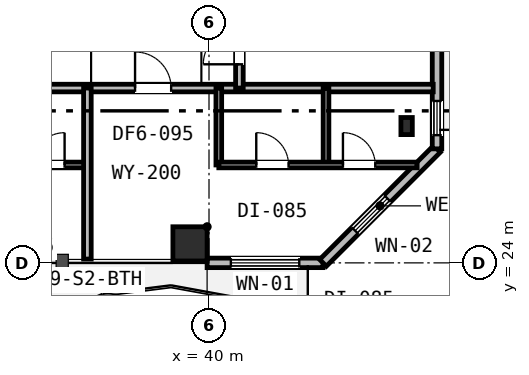
"""IFC4 building model, lengths in metres.
Left out: names, types, materials, properties, quantities, classifications, styles, units other than length and angle.
Written with IfcOpenShell. Run it as: python <this file> out.ifc"""

import sys

from ifc_helpers import new_model, si_unit, direction, frame, frame_2d, origin, origin_2d, place, context, subcontext, project, spatial, rectangle, i_section, extrude, element, fill, save


model = new_model("IFC4")
c1 = context("Model", 3, precision=1e-05, world=origin(), true_north=direction((0.0, 1.0)))
c2 = subcontext(c1, "Body", "Model", "MODEL_VIEW")
j1 = project(units=[si_unit("LENGTHUNIT", "METRE"), si_unit("PLANEANGLEUNIT", "RADIAN")], contexts=[c1])
p1 = place(None, origin())
s1 = spatial("IfcSite", under=j1, at=p1, CompositionType="ELEMENT")
p2 = place(p1, origin())
s2 = spatial("IfcBuilding", under=s1, at=p2, CompositionType="ELEMENT")
p3 = place(p2, frame((0.0, 0.0, 229.8)))
s3 = spatial("IfcBuildingStorey", under=s2, at=p3, CompositionType="ELEMENT", Elevation=229.8)
p4 = place(p3, frame((39.5, 24.5, 0.0), z_axis=(0.0, 0.0, 1.0), x_axis=(1.0, 0.0, 0.0)))
e1 = element("IfcColumn", 1, at=p4, inside=s3, PredefinedType="COLUMN", context=c2, shape_type="SweptSolid", body=[
    extrude(rectangle(XDim=0.9, YDim=0.9, at=origin_2d()), origin(), (0.0, 0.0, 1.0), 3.8),
])
p5 = place(p3, frame((45.2, 27.6, 0.0), z_axis=(0.0, 0.0, 1.0), x_axis=(1.0, 0.0, 0.0)))
e2 = element("IfcColumn", 2, at=p5, inside=s3, PredefinedType="COLUMN", context=c2, shape_type="SweptSolid", body=[
    extrude(i_section(OverallWidth=0.3, OverallDepth=0.45, WebThickness=0.014, FlangeThickness=0.026, FilletRadius=0.027, at=origin_2d()), origin(), (0.0, 0.0, 1.0), 3.8),
])
p6 = place(p3, frame((39.95, 24.0, 0.0), z_axis=(0.0, 0.0, 1.0), x_axis=(1.0, 0.0, 0.0)))
e3 = element("IfcWall", 3, at=p6, inside=s3, PredefinedType="STANDARD", context=c2, shape_type="SweptSolid", body=[
    extrude(rectangle(XDim=3.05, YDim=0.25, at=frame_2d((1.525, 0.0))), origin(), (0.0, 0.0, 1.0), 3.53),
])
p7 = place(p6, frame((0.625, 0.0, 0.75)))
e4 = element("IfcOpeningElement", 4, at=p7, cuts=e3, PredefinedType="OPENING", context=c2, shape_type="SweptSolid", body=[
    extrude(rectangle(XDim=1.8, YDim=1.85, at=frame_2d((0.9, 0.925))), frame((0.0, 0.135, 0.0), z_axis=(0.0, -1.0, 0.0), x_axis=(1.0, 0.0, 0.0)), (0.0, 0.0, 1.0), 0.27),
])
p8 = place(p3, frame((43.0, 24.0, 0.0), z_axis=(0.0, 0.0, 1.0), x_axis=(0.707106781187, 0.707106781187, 0.0)))
e5 = element("IfcWall", 5, at=p8, inside=s3, PredefinedType="STANDARD", context=c2, shape_type="SweptSolid", body=[
    extrude(rectangle(XDim=4.243, YDim=0.25, at=frame_2d((2.121, 0.0))), origin(), (0.0, 0.0, 1.0), 3.53),
])
p9 = place(p8, frame((1.196, 0.0, 0.85)))
e6 = element("IfcOpeningElement", 6, at=p9, cuts=e5, PredefinedType="OPENING", context=c2, shape_type="SweptSolid", body=[
    extrude(rectangle(XDim=1.2, YDim=1.6, at=frame_2d((0.6, 0.8))), frame((0.0, 0.135, 0.0), z_axis=(0.0, -1.0, 0.0), x_axis=(1.0, 0.0, 0.0)), (0.0, 0.0, 1.0), 0.27),
])
p10 = place(p3, frame((46.0, 27.0, 0.0), z_axis=(0.0, 0.0, 1.0), x_axis=(0.0, 1.0, 0.0)))
e7 = element("IfcWall", 7, at=p10, inside=s3, PredefinedType="STANDARD", context=c2, shape_type="SweptSolid", body=[
    extrude(rectangle(XDim=2.9, YDim=0.25, at=frame_2d((1.45, 0.0))), origin(), (0.0, 0.0, 1.0), 3.53),
])
p11 = place(p10, frame((0.36, 0.0, 0.9)))
e8 = element("IfcOpeningElement", 8, at=p11, cuts=e7, PredefinedType="OPENING", context=c2, shape_type="SweptSolid", body=[
    extrude(rectangle(XDim=0.9, YDim=1.55, at=frame_2d((0.45, 0.775))), frame((0.0, 0.135, 0.0), z_axis=(0.0, -1.0, 0.0), x_axis=(1.0, 0.0, 0.0)), (0.0, 0.0, 1.0), 0.27),
])
p12 = place(p3, frame((20.2, 28.6, 0.0), z_axis=(0.0, 0.0, 1.0), x_axis=(1.0, 0.0, 0.0)))
e9 = element("IfcWall", 9, at=p12, inside=s3, PredefinedType="PARTITIONING", context=c2, shape_type="SweptSolid", body=[
    extrude(rectangle(XDim=25.7, YDim=0.2, at=frame_2d((12.85, 0.0))), origin(), (0.0, 0.0, 1.0), 2.92),
])
p13 = place(p12, frame((4.475, 0.0, 0.0)))
e10 = element("IfcOpeningElement", 10, at=p13, cuts=e9, PredefinedType="OPENING", context=c2, shape_type="SweptSolid", body=[
    extrude(rectangle(XDim=0.95, YDim=2.15, at=frame_2d((0.475, 1.075))), frame((0.0, 0.11, 0.0), z_axis=(0.0, -1.0, 0.0), x_axis=(1.0, 0.0, 0.0)), (0.0, 0.0, 1.0), 0.22),
])
p14 = place(p12, frame((10.875, 0.0, 0.0)))
e11 = element("IfcOpeningElement", 11, at=p14, cuts=e9, PredefinedType="OPENING", context=c2, shape_type="SweptSolid", body=[
    extrude(rectangle(XDim=0.95, YDim=2.15, at=frame_2d((0.475, 1.075))), frame((0.0, 0.11, 0.0), z_axis=(0.0, -1.0, 0.0), x_axis=(1.0, 0.0, 0.0)), (0.0, 0.0, 1.0), 0.22),
])
p15 = place(p12, frame((17.854, 0.0, 0.0)))
e12 = element("IfcOpeningElement", 12, at=p15, cuts=e9, PredefinedType="OPENING", context=c2, shape_type="SweptSolid", body=[
    extrude(rectangle(XDim=0.95, YDim=2.15, at=frame_2d((0.475, 1.075))), frame((0.0, 0.11, 0.0), z_axis=(0.0, -1.0, 0.0), x_axis=(1.0, 0.0, 0.0)), (0.0, 0.0, 1.0), 0.22),
])
p16 = place(p3, frame((40.8, 28.6, 0.0), z_axis=(0.0, 0.0, 1.0), x_axis=(0.0, 1.0, 0.0)))
e13 = element("IfcWall", 13, at=p16, inside=s3, PredefinedType="PARTITIONING", context=c2, shape_type="SweptSolid", body=[
    extrude(rectangle(XDim=14.3, YDim=0.2, at=frame_2d((7.15, 0.0))), origin(), (0.0, 0.0, 1.0), 2.92),
])
p17 = place(p16, frame((0.625, 0.0, 0.0)))
e14 = element("IfcOpeningElement", 14, at=p17, cuts=e13, PredefinedType="OPENING", context=c2, shape_type="SweptSolid", body=[
    extrude(rectangle(XDim=0.95, YDim=2.15, at=frame_2d((0.475, 1.075))), frame((0.0, 0.11, 0.0), z_axis=(0.0, -1.0, 0.0), x_axis=(1.0, 0.0, 0.0)), (0.0, 0.0, 1.0), 0.22),
])
p18 = place(p3, frame((32.7, 26.576, 0.0), z_axis=(0.0, 0.0, 1.0), x_axis=(1.0, 0.0, 0.0)))
e15 = element("IfcWall", 15, at=p18, inside=s3, PredefinedType="PARTITIONING", context=c2, shape_type="SweptSolid", body=[
    extrude(rectangle(XDim=4.1, YDim=0.15, at=frame_2d((2.05, 0.0))), origin(), (0.0, 0.0, 1.0), 3.22),
])
p19 = place(p18, frame((0.6, 0.0, 0.0)))
e16 = element("IfcOpeningElement", 16, at=p19, cuts=e15, PredefinedType="OPENING", context=c2, shape_type="SweptSolid", body=[
    extrude(rectangle(XDim=0.85, YDim=2.15, at=frame_2d((0.425, 1.075))), frame((0.0, 0.085, 0.0), z_axis=(0.0, -1.0, 0.0), x_axis=(1.0, 0.0, 0.0)), (0.0, 0.0, 1.0), 0.17),
])
p20 = place(p18, frame((2.65, 0.0, 0.0)))
e17 = element("IfcOpeningElement", 17, at=p20, cuts=e15, PredefinedType="OPENING", context=c2, shape_type="SweptSolid", body=[
    extrude(rectangle(XDim=0.85, YDim=2.15, at=frame_2d((0.425, 1.075))), frame((0.0, 0.085, 0.0), z_axis=(0.0, -1.0, 0.0), x_axis=(1.0, 0.0, 0.0)), (0.0, 0.0, 1.0), 0.17),
])
p21 = place(p3, frame((36.8, 24.1, 0.0), z_axis=(0.0, 0.0, 1.0), x_axis=(0.0, 1.0, 0.0)))
e18 = element("IfcWall", 18, at=p21, inside=s3, PredefinedType="PARTITIONING", context=c2, shape_type="SweptSolid", body=[
    extrude(rectangle(XDim=4.5, YDim=0.2, at=frame_2d((2.25, 0.0))), origin(), (0.0, 0.0, 1.0), 3.22),
])
for number, where, z_axis, x_axis in (
    (19, (40.258, 26.576, 0.0), (0.0, 0.0, 1.0), (0.0, 1.0, 0.0)),
    (20, (43.079, 26.576, 0.0), (0.0, 0.0, 1.0), (0.0, 1.0, 0.0)),
):
    element("IfcWall", number, at=place(p3, frame(where, z_axis=z_axis, x_axis=x_axis)), inside=s3, PredefinedType="PARTITIONING", context=c2, shape_type="SweptSolid", body=[
        extrude(rectangle(XDim=2.024, YDim=0.15, at=frame_2d((1.012, 0.0))), origin(), (0.0, 0.0, 1.0), 3.53),
    ])
p22 = place(p3, frame((40.258, 26.576, 0.0), z_axis=(0.0, 0.0, 1.0), x_axis=(1.0, 0.0, 0.0)))
e21 = element("IfcWall", 21, at=p22, inside=s3, PredefinedType="PARTITIONING", context=c2, shape_type="SweptSolid", body=[
    extrude(rectangle(XDim=5.218, YDim=0.15, at=frame_2d((2.609, 0.0))), origin(), (0.0, 0.0, 1.0), 3.53),
])
p23 = place(p22, frame((0.986, 0.0, 0.0)))
e22 = element("IfcOpeningElement", 22, at=p23, cuts=e21, PredefinedType="OPENING", context=c2, shape_type="SweptSolid", body=[
    extrude(rectangle(XDim=0.85, YDim=2.15, at=frame_2d((0.425, 1.075))), frame((0.0, 0.085, 0.0), z_axis=(0.0, -1.0, 0.0), x_axis=(1.0, 0.0, 0.0)), (0.0, 0.0, 1.0), 0.17),
])
p24 = place(p22, frame((3.267, 0.0, 0.0)))
e23 = element("IfcOpeningElement", 23, at=p24, cuts=e21, PredefinedType="OPENING", context=c2, shape_type="SweptSolid", body=[
    extrude(rectangle(XDim=0.85, YDim=2.15, at=frame_2d((0.425, 1.075))), frame((0.0, 0.085, 0.0), z_axis=(0.0, -1.0, 0.0), x_axis=(1.0, 0.0, 0.0)), (0.0, 0.0, 1.0), 0.17),
])
p25 = place(p7, origin())
e24 = element("IfcWindow", 24, at=p25, inside=s3, PartitioningType="SINGLE_PANEL", PredefinedType="WINDOW", context=c2, shape_type="SweptSolid", body=[
    extrude(rectangle(XDim=1.8, YDim=1.85, at=frame_2d((0.9, 0.925))), frame((0.0, 0.03, 0.0), z_axis=(0.0, -1.0, 0.0), x_axis=(1.0, 0.0, 0.0)), (0.0, 0.0, 1.0), 0.06),
])
fill(e4, e24)
p26 = place(p9, origin())
e25 = element("IfcWindow", 25, at=p26, inside=s3, PartitioningType="SINGLE_PANEL", PredefinedType="WINDOW", context=c2, shape_type="SweptSolid", body=[
    extrude(rectangle(XDim=1.2, YDim=1.6, at=frame_2d((0.6, 0.8))), frame((0.0, 0.03, 0.0), z_axis=(0.0, -1.0, 0.0), x_axis=(1.0, 0.0, 0.0)), (0.0, 0.0, 1.0), 0.06),
])
fill(e6, e25)
p27 = place(p11, origin())
e26 = element("IfcWindow", 26, at=p27, inside=s3, PartitioningType="SINGLE_PANEL", PredefinedType="WINDOW", context=c2, shape_type="SweptSolid", body=[
    extrude(rectangle(XDim=0.9, YDim=1.55, at=frame_2d((0.45, 0.775))), frame((0.0, 0.03, 0.0), z_axis=(0.0, -1.0, 0.0), x_axis=(1.0, 0.0, 0.0)), (0.0, 0.0, 1.0), 0.06),
])
fill(e8, e26)
p28 = place(p17, origin())
e27 = element("IfcDoor", 27, at=p28, inside=s3, OperationType="SINGLE_SWING_LEFT", PredefinedType="DOOR", context=c2, shape_type="SweptSolid", body=[
    extrude(rectangle(XDim=0.95, YDim=2.15, at=frame_2d((0.475, 1.075))), frame((0.0, 0.025, 0.0), z_axis=(0.0, -1.0, 0.0), x_axis=(1.0, 0.0, 0.0)), (0.0, 0.0, 1.0), 0.05),
])
fill(e14, e27)
p29 = place(p20, origin())
e28 = element("IfcDoor", 28, at=p29, inside=s3, OperationType="SINGLE_SWING_RIGHT", PredefinedType="DOOR", context=c2, shape_type="SweptSolid", body=[
    extrude(rectangle(XDim=0.85, YDim=2.15, at=frame_2d((0.425, 1.075))), frame((0.0, 0.025, 0.0), z_axis=(0.0, -1.0, 0.0), x_axis=(1.0, 0.0, 0.0)), (0.0, 0.0, 1.0), 0.05),
])
fill(e17, e28)
p30 = place(p15, origin())
e29 = element("IfcDoor", 29, at=p30, inside=s3, OperationType="SINGLE_SWING_LEFT", PredefinedType="DOOR", context=c2, shape_type="SweptSolid", body=[
    extrude(rectangle(XDim=0.95, YDim=2.15, at=frame_2d((0.475, 1.075))), frame((0.0, 0.025, 0.0), z_axis=(0.0, -1.0, 0.0), x_axis=(1.0, 0.0, 0.0)), (0.0, 0.0, 1.0), 0.05),
])
fill(e12, e29)
p31 = place(p23, origin())
e30 = element("IfcDoor", 30, at=p31, inside=s3, OperationType="SINGLE_SWING_LEFT", PredefinedType="DOOR", context=c2, shape_type="SweptSolid", body=[
    extrude(rectangle(XDim=0.85, YDim=2.15, at=frame_2d((0.425, 1.075))), frame((0.0, 0.025, 0.0), z_axis=(0.0, -1.0, 0.0), x_axis=(1.0, 0.0, 0.0)), (0.0, 0.0, 1.0), 0.05),
])
fill(e22, e30)
p32 = place(p24, origin())
e31 = element("IfcDoor", 31, at=p32, inside=s3, OperationType="SINGLE_SWING_LEFT", PredefinedType="DOOR", context=c2, shape_type="SweptSolid", body=[
    extrude(rectangle(XDim=0.85, YDim=2.15, at=frame_2d((0.425, 1.075))), frame((0.0, 0.025, 0.0), z_axis=(0.0, -1.0, 0.0), x_axis=(1.0, 0.0, 0.0)), (0.0, 0.0, 1.0), 0.05),
])
fill(e23, e31)
save(model, sys.argv[1])
